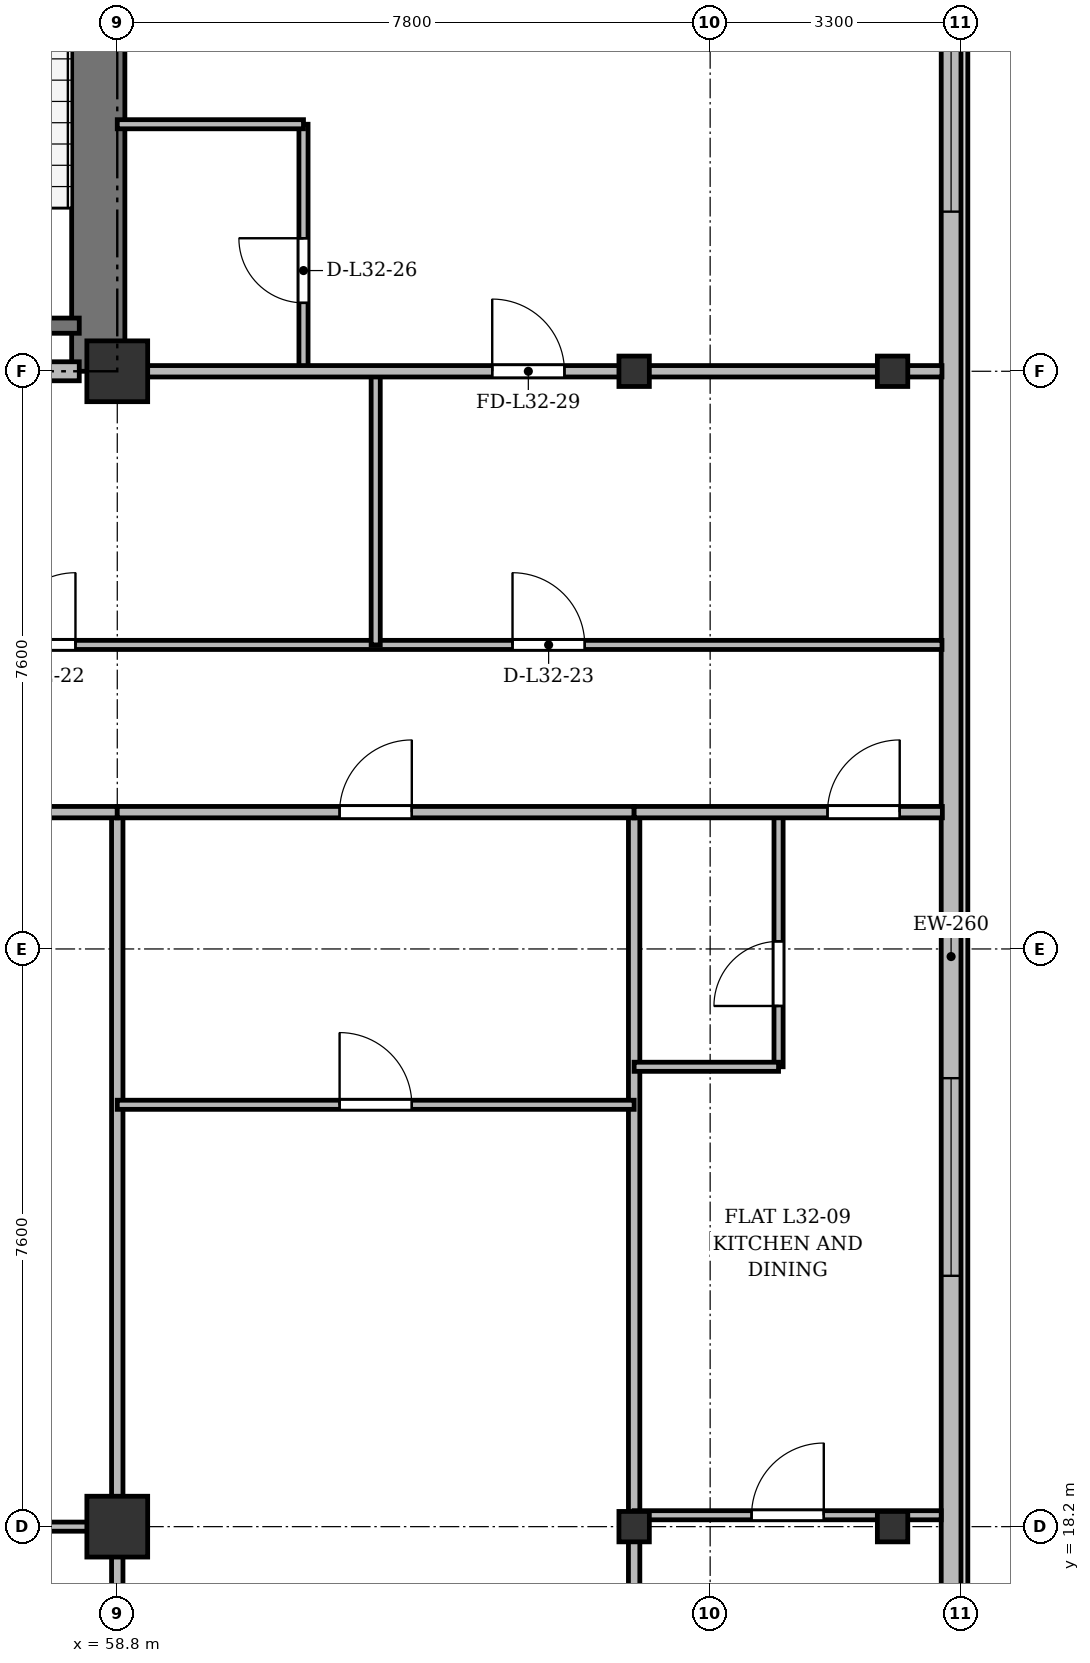
"""IFC4 building model, lengths in metres.
Left out: names, types, materials, properties, quantities, classifications, styles, units other than length and angle.
Written with IfcOpenShell. Run it as: python <this file> out.ifc"""

import sys

from ifc_helpers import new_model, si_unit, direction, frame, frame_2d, origin, origin_2d, place, context, subcontext, project, spatial, rectangle, i_section, extrude, source, transform, mapped, element, fill, save


model = new_model("IFC4")
c1 = context("Model", 3, precision=1e-05, world=origin(), true_north=direction((0.0, 1.0)))
c2 = subcontext(c1, "Body", "Model", "MODEL_VIEW")
j1 = project(units=[si_unit("LENGTHUNIT", "METRE"), si_unit("PLANEANGLEUNIT", "RADIAN")], contexts=[c1])
p1 = place(None, origin())
s1 = spatial("IfcSite", under=j1, at=p1, CompositionType="ELEMENT")
p2 = place(p1, origin())
s2 = spatial("IfcBuilding", under=s1, at=p2, CompositionType="ELEMENT")
p3 = place(p2, frame((0.0, 0.0, 124.9)))
s3 = spatial("IfcBuildingStorey", under=s2, at=p3, CompositionType="ELEMENT", Elevation=124.9)
m1 = source(origin(), c2, "Body", "SweptSolid", [
    extrude(rectangle(XDim=0.8, YDim=0.8, at=origin_2d()), origin(), (0.0, 0.0, 1.0), 3.6),
])
for number, where, z_axis, x_axis in (
    (1, (58.8, 18.2, 0.0), (0.0, 0.0, 1.0), (1.0, 0.0, 0.0)),
    (2, (58.8, 33.4, 0.0), (0.0, 0.0, 1.0), (1.0, 0.0, 0.0)),
):
    element("IfcColumn", number, at=place(p3, frame(where, z_axis=z_axis, x_axis=x_axis)), inside=s3, PredefinedType="COLUMN", context=c2, shape_type="MappedRepresentation", body=[
        mapped(m1, transform((0.0, 0.0, 0.0), x_axis=(1.0, 0.0, 0.0), y_axis=(0.0, 1.0, 0.0), z_axis=(0.0, 0.0, 1.0), scale=1.0)),
    ])
m2 = source(origin(), c2, "Body", "SweptSolid", [
    extrude(i_section(OverallWidth=0.4, OverallDepth=0.4, WebThickness=0.022, FlangeThickness=0.035, at=origin_2d()), origin(), (0.0, 0.0, 1.0), 3.6),
])
for number, where, z_axis, x_axis in (
    (3, (65.6, 18.2, 0.0), (0.0, 0.0, 1.0), (1.0, 0.0, 0.0)),
    (4, (65.6, 33.4, 0.0), (0.0, 0.0, 1.0), (1.0, 0.0, 0.0)),
    (5, (69.0, 18.2, 0.0), (0.0, 0.0, 1.0), (1.0, 0.0, 0.0)),
    (6, (69.0, 33.4, 0.0), (0.0, 0.0, 1.0), (1.0, 0.0, 0.0)),
):
    element("IfcColumn", number, at=place(p3, frame(where, z_axis=z_axis, x_axis=x_axis)), inside=s3, PredefinedType="COLUMN", context=c2, shape_type="MappedRepresentation", body=[
        mapped(m2, transform((0.0, 0.0, 0.0), x_axis=(1.0, 0.0, 0.0), y_axis=(0.0, 1.0, 0.0), z_axis=(0.0, 0.0, 1.0), scale=1.0)),
    ])
p4 = place(p3, frame((69.77, 45.5, 0.0), z_axis=(0.0, 0.0, 1.0), x_axis=(0.0, -1.0, 0.0)))
e7 = element("IfcWall", 7, at=p4, inside=s3, PredefinedType="SOLIDWALL", context=c2, shape_type="SweptSolid", body=[
    extrude(rectangle(XDim=39.6, YDim=0.26, at=frame_2d((19.8, 0.0))), origin(), (0.0, 0.0, 1.0), 3.34),
])
p5 = place(p4, frame((36.95, 0.0, 0.92)))
e8 = element("IfcOpeningElement", 8, at=p5, cuts=e7, PredefinedType="OPENING", context=c2, shape_type="SweptSolid", body=[
    extrude(rectangle(XDim=1.2, YDim=1.65, at=frame_2d((0.6, 0.825))), frame((0.0, 0.14, 0.0), z_axis=(0.0, -1.0, 0.0), x_axis=(1.0, 0.0, 0.0)), (0.0, 0.0, 1.0), 0.28),
])
p6 = place(p4, frame((32.8, 0.0, 0.92)))
e9 = element("IfcOpeningElement", 9, at=p6, cuts=e7, PredefinedType="OPENING", context=c2, shape_type="SweptSolid", body=[
    extrude(rectangle(XDim=2.6, YDim=1.9, at=frame_2d((1.3, 0.95))), frame((0.0, 0.14, 0.0), z_axis=(0.0, -1.0, 0.0), x_axis=(1.0, 0.0, 0.0)), (0.0, 0.0, 1.0), 0.28),
])
p7 = place(p4, frame((28.6, 0.0, 0.92)))
e10 = element("IfcOpeningElement", 10, at=p7, cuts=e7, PredefinedType="OPENING", context=c2, shape_type="SweptSolid", body=[
    extrude(rectangle(XDim=2.6, YDim=1.9, at=frame_2d((1.3, 0.95))), frame((0.0, 0.14, 0.0), z_axis=(0.0, -1.0, 0.0), x_axis=(1.0, 0.0, 0.0)), (0.0, 0.0, 1.0), 0.28),
])
p8 = place(p4, frame((21.4, 0.0, 0.92)))
e11 = element("IfcOpeningElement", 11, at=p8, cuts=e7, PredefinedType="OPENING", context=c2, shape_type="SweptSolid", body=[
    extrude(rectangle(XDim=2.6, YDim=1.9, at=frame_2d((1.3, 0.95))), frame((0.0, 0.14, 0.0), z_axis=(0.0, -1.0, 0.0), x_axis=(1.0, 0.0, 0.0)), (0.0, 0.0, 1.0), 0.28),
])
p9 = place(p4, frame((7.4, 0.0, 0.92)))
e12 = element("IfcOpeningElement", 12, at=p9, cuts=e7, PredefinedType="OPENING", context=c2, shape_type="SweptSolid", body=[
    extrude(rectangle(XDim=2.6, YDim=1.9, at=frame_2d((1.3, 0.95))), frame((0.0, 0.14, 0.0), z_axis=(0.0, -1.0, 0.0), x_axis=(1.0, 0.0, 0.0)), (0.0, 0.0, 1.0), 0.28),
])
p10 = place(p4, frame((4.5, 0.0, 0.92)))
e13 = element("IfcOpeningElement", 13, at=p10, cuts=e7, PredefinedType="OPENING", context=c2, shape_type="SweptSolid", body=[
    extrude(rectangle(XDim=1.2, YDim=1.65, at=frame_2d((0.6, 0.825))), frame((0.0, 0.14, 0.0), z_axis=(0.0, -1.0, 0.0), x_axis=(1.0, 0.0, 0.0)), (0.0, 0.0, 1.0), 0.28),
])
p11 = place(p4, frame((1.15, 0.0, 0.92)))
e14 = element("IfcOpeningElement", 14, at=p11, cuts=e7, PredefinedType="OPENING", context=c2, shape_type="SweptSolid", body=[
    extrude(rectangle(XDim=1.2, YDim=1.65, at=frame_2d((0.6, 0.825))), frame((0.0, 0.14, 0.0), z_axis=(0.0, -1.0, 0.0), x_axis=(1.0, 0.0, 0.0)), (0.0, 0.0, 1.0), 0.28),
])
p12 = place(p3, frame((58.55, 33.4, 0.0), z_axis=(0.0, 0.0, 1.0), x_axis=(0.0, 1.0, 0.0)))
e15 = element("IfcWall", 15, at=p12, inside=s3, PredefinedType="SHEAR", context=c2, shape_type="SweptSolid", body=[
    extrude(rectangle(XDim=11.7, YDim=0.7, at=frame_2d((5.85, 0.0))), origin(), (0.0, 0.0, 1.0), 3.34),
])
p13 = place(p3, frame((54.9, 34.0, 0.0), z_axis=(0.0, 0.0, 1.0), x_axis=(1.0, 0.0, 0.0)))
e16 = element("IfcWall", 16, at=p13, inside=s3, PredefinedType="SHEAR", context=c2, shape_type="SweptSolid", body=[
    extrude(rectangle(XDim=3.4, YDim=0.2, at=frame_2d((1.7, 0.0))), origin(), (0.0, 0.0, 1.0), 3.34),
])
p14 = place(p3, frame((47.15, 33.4, 0.0), z_axis=(0.0, 0.0, 1.0), x_axis=(1.0, 0.0, 0.0)))
e17 = element("IfcWall", 17, at=p14, inside=s3, PredefinedType="PARTITIONING", context=c2, shape_type="SweptSolid", body=[
    extrude(rectangle(XDim=11.15, YDim=0.25, at=frame_2d((5.575, 0.0))), origin(), (0.0, 0.0, 1.0), 2.752),
])
p15 = place(p14, frame((0.7, 0.0, 0.0)))
e18 = element("IfcOpeningElement", 18, at=p15, cuts=e17, PredefinedType="OPENING", context=c2, shape_type="SweptSolid", body=[
    extrude(rectangle(XDim=0.95, YDim=2.15, at=frame_2d((0.475, 1.075))), frame((0.0, 0.135, 0.0), z_axis=(0.0, -1.0, 0.0), x_axis=(1.0, 0.0, 0.0)), (0.0, 0.0, 1.0), 0.27),
])
p16 = place(p14, frame((6.0, 0.0, 0.0)))
e19 = element("IfcOpeningElement", 19, at=p16, cuts=e17, PredefinedType="OPENING", context=c2, shape_type="SweptSolid", body=[
    extrude(rectangle(XDim=1.2, YDim=2.15, at=frame_2d((0.6, 1.075))), frame((0.0, 0.135, 0.0), z_axis=(0.0, -1.0, 0.0), x_axis=(1.0, 0.0, 0.0)), (0.0, 0.0, 1.0), 0.27),
])
p17 = place(p3, frame((54.8, 29.8, 0.0), z_axis=(0.0, 0.0, 1.0), x_axis=(1.0, 0.0, 0.0)))
e20 = element("IfcWall", 20, at=p17, inside=s3, PredefinedType="PARTITIONING", context=c2, shape_type="SweptSolid", body=[
    extrude(rectangle(XDim=14.85, YDim=0.12, at=frame_2d((7.425, 0.0))), origin(), (0.0, 0.0, 1.0), 2.84),
])
p18 = place(p17, frame((2.5, 0.0, 0.0)))
e21 = element("IfcOpeningElement", 21, at=p18, cuts=e20, PredefinedType="OPENING", context=c2, shape_type="SweptSolid", body=[
    extrude(rectangle(XDim=0.95, YDim=2.15, at=frame_2d((0.475, 1.075))), frame((0.0, 0.07, 0.0), z_axis=(0.0, -1.0, 0.0), x_axis=(1.0, 0.0, 0.0)), (0.0, 0.0, 1.0), 0.14),
])
p19 = place(p17, frame((9.2, 0.0, 0.0)))
e22 = element("IfcOpeningElement", 22, at=p19, cuts=e20, PredefinedType="OPENING", context=c2, shape_type="SweptSolid", body=[
    extrude(rectangle(XDim=0.95, YDim=2.15, at=frame_2d((0.475, 1.075))), frame((0.0, 0.07, 0.0), z_axis=(0.0, -1.0, 0.0), x_axis=(1.0, 0.0, 0.0)), (0.0, 0.0, 1.0), 0.14),
])
p20 = place(p3, frame((62.2, 29.8, 0.0), z_axis=(0.0, 0.0, 1.0), x_axis=(0.0, 1.0, 0.0)))
e23 = element("IfcWall", 23, at=p20, inside=s3, PredefinedType="PARTITIONING", context=c2, shape_type="SweptSolid", body=[
    extrude(rectangle(XDim=3.6, YDim=0.12, at=frame_2d((1.8, 0.0))), origin(), (0.0, 0.0, 1.0), 2.752),
])
p21 = place(p3, frame((61.25, 33.4, 0.0), z_axis=(0.0, 0.0, 1.0), x_axis=(0.0, 1.0, 0.0)))
e24 = element("IfcWall", 24, at=p21, inside=s3, PredefinedType="PARTITIONING", context=c2, shape_type="SweptSolid", body=[
    extrude(rectangle(XDim=3.25, YDim=0.12, at=frame_2d((1.625, 0.0))), origin(), (0.0, 0.0, 1.0), 2.752),
])
p22 = place(p21, frame((0.9, 0.0, 0.0)))
e25 = element("IfcOpeningElement", 25, at=p22, cuts=e24, PredefinedType="OPENING", context=c2, shape_type="SweptSolid", body=[
    extrude(rectangle(XDim=0.85, YDim=2.1, at=frame_2d((0.425, 1.05))), frame((0.0, 0.07, 0.0), z_axis=(0.0, -1.0, 0.0), x_axis=(1.0, 0.0, 0.0)), (0.0, 0.0, 1.0), 0.14),
])
p23 = place(p3, frame((58.8, 36.65, 0.0), z_axis=(0.0, 0.0, 1.0), x_axis=(1.0, 0.0, 0.0)))
e26 = element("IfcWall", 26, at=p23, inside=s3, PredefinedType="PARTITIONING", context=c2, shape_type="SweptSolid", body=[
    extrude(rectangle(XDim=2.45, YDim=0.12, at=frame_2d((1.225, 0.0))), origin(), (0.0, 0.0, 1.0), 2.84),
])
p24 = place(p3, frame((58.8, 33.4, 0.0), z_axis=(0.0, 0.0, 1.0), x_axis=(1.0, 0.0, 0.0)))
e27 = element("IfcWall", 27, at=p24, inside=s3, PredefinedType="PARTITIONING", context=c2, shape_type="SweptSolid", body=[
    extrude(rectangle(XDim=10.85, YDim=0.15, at=frame_2d((5.425, 0.0))), origin(), (0.0, 0.0, 1.0), 2.752),
])
p25 = place(p24, frame((4.933, 0.0, 0.0)))
e28 = element("IfcOpeningElement", 28, at=p25, cuts=e27, PredefinedType="OPENING", context=c2, shape_type="SweptSolid", body=[
    extrude(rectangle(XDim=0.95, YDim=2.15, at=frame_2d((0.475, 1.075))), frame((0.0, 0.085, 0.0), z_axis=(0.0, -1.0, 0.0), x_axis=(1.0, 0.0, 0.0)), (0.0, 0.0, 1.0), 0.17),
])
for number, where, z_axis, x_axis in (
    (29, (58.8, 3.145, 0.0), (0.0, 0.0, 1.0), (0.0, 1.0, 0.0)),
    (30, (65.6, 3.145, 0.0), (0.0, 0.0, 1.0), (0.0, 1.0, 0.0)),
):
    element("IfcWall", number, at=place(p3, frame(where, z_axis=z_axis, x_axis=x_axis)), inside=s3, PredefinedType="PARTITIONING", context=c2, shape_type="SweptSolid", body=[
        extrude(rectangle(XDim=24.455, YDim=0.15, at=frame_2d((12.228, 0.0))), origin(), (0.0, 0.0, 1.0), 2.84),
    ])
p26 = place(p3, frame((51.0, 27.6, 0.0), z_axis=(0.0, 0.0, 1.0), x_axis=(1.0, 0.0, 0.0)))
e31 = element("IfcWall", 31, at=p26, inside=s3, PredefinedType="PARTITIONING", context=c2, shape_type="SweptSolid", body=[
    extrude(rectangle(XDim=7.8, YDim=0.15, at=frame_2d((3.9, 0.0))), origin(), (0.0, 0.0, 1.0), 2.84),
])
p27 = place(p26, frame((3.333, 0.0, 0.0)))
e32 = element("IfcOpeningElement", 32, at=p27, cuts=e31, PredefinedType="OPENING", context=c2, shape_type="SweptSolid", body=[
    extrude(rectangle(XDim=0.95, YDim=2.15, at=frame_2d((0.475, 1.075))), frame((0.0, 0.085, 0.0), z_axis=(0.0, -1.0, 0.0), x_axis=(1.0, 0.0, 0.0)), (0.0, 0.0, 1.0), 0.17),
])
p28 = place(p3, frame((51.0, 18.2, 0.0), z_axis=(0.0, 0.0, 1.0), x_axis=(1.0, 0.0, 0.0)))
e33 = element("IfcWall", 33, at=p28, inside=s3, PredefinedType="PARTITIONING", context=c2, shape_type="SweptSolid", body=[
    extrude(rectangle(XDim=7.8, YDim=0.12, at=frame_2d((3.9, 0.0))), origin(), (0.0, 0.0, 1.0), 2.752),
])
p29 = place(p28, frame((3.333, 0.0, 0.0)))
e34 = element("IfcOpeningElement", 34, at=p29, cuts=e33, PredefinedType="OPENING", context=c2, shape_type="SweptSolid", body=[
    extrude(rectangle(XDim=0.95, YDim=2.15, at=frame_2d((0.475, 1.075))), frame((0.0, 0.07, 0.0), z_axis=(0.0, -1.0, 0.0), x_axis=(1.0, 0.0, 0.0)), (0.0, 0.0, 1.0), 0.14),
])
p30 = place(p3, frame((58.8, 27.6, 0.0), z_axis=(0.0, 0.0, 1.0), x_axis=(1.0, 0.0, 0.0)))
e35 = element("IfcWall", 35, at=p30, inside=s3, PredefinedType="PARTITIONING", context=c2, shape_type="SweptSolid", body=[
    extrude(rectangle(XDim=6.8, YDim=0.15, at=frame_2d((3.4, 0.0))), origin(), (0.0, 0.0, 1.0), 2.84),
])
p31 = place(p30, frame((2.925, 0.0, 0.0)))
e36 = element("IfcOpeningElement", 36, at=p31, cuts=e35, PredefinedType="OPENING", context=c2, shape_type="SweptSolid", body=[
    extrude(rectangle(XDim=0.95, YDim=2.15, at=frame_2d((0.475, 1.075))), frame((0.0, 0.085, 0.0), z_axis=(0.0, -1.0, 0.0), x_axis=(1.0, 0.0, 0.0)), (0.0, 0.0, 1.0), 0.17),
])
p32 = place(p3, frame((58.8, 23.75, 0.0), z_axis=(0.0, 0.0, 1.0), x_axis=(1.0, 0.0, 0.0)))
e37 = element("IfcWall", 37, at=p32, inside=s3, PredefinedType="PARTITIONING", context=c2, shape_type="SweptSolid", body=[
    extrude(rectangle(XDim=6.8, YDim=0.12, at=frame_2d((3.4, 0.0))), origin(), (0.0, 0.0, 1.0), 2.84),
])
p33 = place(p32, frame((2.925, 0.0, 0.0)))
e38 = element("IfcOpeningElement", 38, at=p33, cuts=e37, PredefinedType="OPENING", context=c2, shape_type="SweptSolid", body=[
    extrude(rectangle(XDim=0.95, YDim=2.15, at=frame_2d((0.475, 1.075))), frame((0.0, 0.07, 0.0), z_axis=(0.0, -1.0, 0.0), x_axis=(1.0, 0.0, 0.0)), (0.0, 0.0, 1.0), 0.14),
])
p34 = place(p3, frame((65.6, 18.35, 0.0), z_axis=(0.0, 0.0, 1.0), x_axis=(1.0, 0.0, 0.0)))
e39 = element("IfcWall", 39, at=p34, inside=s3, PredefinedType="PARTITIONING", context=c2, shape_type="SweptSolid", body=[
    extrude(rectangle(XDim=4.04, YDim=0.12, at=frame_2d((2.02, 0.0))), origin(), (0.0, 0.0, 1.0), 2.752),
])
p35 = place(p34, frame((1.545, 0.0, 0.0)))
e40 = element("IfcOpeningElement", 40, at=p35, cuts=e39, PredefinedType="OPENING", context=c2, shape_type="SweptSolid", body=[
    extrude(rectangle(XDim=0.95, YDim=2.15, at=frame_2d((0.475, 1.075))), frame((0.0, 0.07, 0.0), z_axis=(0.0, -1.0, 0.0), x_axis=(1.0, 0.0, 0.0)), (0.0, 0.0, 1.0), 0.14),
])
p36 = place(p3, frame((67.5, 24.25, 0.0), z_axis=(0.0, 0.0, 1.0), x_axis=(0.0, 1.0, 0.0)))
e41 = element("IfcWall", 41, at=p36, inside=s3, PredefinedType="PARTITIONING", context=c2, shape_type="SweptSolid", body=[
    extrude(rectangle(XDim=3.35, YDim=0.12, at=frame_2d((1.675, 0.0))), origin(), (0.0, 0.0, 1.0), 2.99),
])
p37 = place(p36, frame((0.8, 0.0, 0.0)))
e42 = element("IfcOpeningElement", 42, at=p37, cuts=e41, PredefinedType="OPENING", context=c2, shape_type="SweptSolid", body=[
    extrude(rectangle(XDim=0.85, YDim=2.1, at=frame_2d((0.425, 1.05))), frame((0.0, 0.07, 0.0), z_axis=(0.0, -1.0, 0.0), x_axis=(1.0, 0.0, 0.0)), (0.0, 0.0, 1.0), 0.14),
])
p38 = place(p3, frame((65.6, 24.25, 0.0), z_axis=(0.0, 0.0, 1.0), x_axis=(1.0, 0.0, 0.0)))
e43 = element("IfcWall", 43, at=p38, inside=s3, PredefinedType="PARTITIONING", context=c2, shape_type="SweptSolid", body=[
    extrude(rectangle(XDim=1.9, YDim=0.12, at=frame_2d((0.95, 0.0))), origin(), (0.0, 0.0, 1.0), 2.84),
])
p39 = place(p3, frame((65.6, 27.6, 0.0), z_axis=(0.0, 0.0, 1.0), x_axis=(1.0, 0.0, 0.0)))
e44 = element("IfcWall", 44, at=p39, inside=s3, PredefinedType="PARTITIONING", context=c2, shape_type="SweptSolid", body=[
    extrude(rectangle(XDim=4.055, YDim=0.15, at=frame_2d((2.027, 0.0))), origin(), (0.0, 0.0, 1.0), 2.84),
])
p40 = place(p39, frame((2.544, 0.0, 0.0)))
e45 = element("IfcOpeningElement", 45, at=p40, cuts=e44, PredefinedType="OPENING", context=c2, shape_type="SweptSolid", body=[
    extrude(rectangle(XDim=0.95, YDim=2.15, at=frame_2d((0.475, 1.075))), frame((0.0, 0.085, 0.0), z_axis=(0.0, -1.0, 0.0), x_axis=(1.0, 0.0, 0.0)), (0.0, 0.0, 1.0), 0.17),
])
m3 = source(origin(), c2, "Body", "SweptSolid", [
    extrude(rectangle(XDim=2.6, YDim=1.9, at=frame_2d((1.3, 0.95))), frame((0.0, 0.03, 0.0), z_axis=(0.0, -1.0, 0.0), x_axis=(1.0, 0.0, 0.0)), (0.0, 0.0, 1.0), 0.06),
])
p41 = place(p8, origin())
e46 = element("IfcWindow", 46, at=p41, inside=s3, PartitioningType="SINGLE_PANEL", PredefinedType="WINDOW", context=c2, shape_type="MappedRepresentation", body=[
    mapped(m3, transform((0.0, 0.0, 0.0), x_axis=(1.0, 0.0, 0.0), y_axis=(0.0, 1.0, 0.0), z_axis=(0.0, 0.0, 1.0), scale=1.0)),
])
fill(e11, e46)
p42 = place(p9, origin())
e47 = element("IfcWindow", 47, at=p42, inside=s3, PartitioningType="SINGLE_PANEL", PredefinedType="WINDOW", context=c2, shape_type="MappedRepresentation", body=[
    mapped(m3, transform((0.0, 0.0, 0.0), x_axis=(1.0, 0.0, 0.0), y_axis=(0.0, 1.0, 0.0), z_axis=(0.0, 0.0, 1.0), scale=1.0)),
])
fill(e12, e47)
m4 = source(origin(), c2, "Body", "SweptSolid", [
    extrude(rectangle(XDim=0.95, YDim=2.15, at=frame_2d((0.475, 1.075))), frame((0.0, 0.025, 0.0), z_axis=(0.0, -1.0, 0.0), x_axis=(1.0, 0.0, 0.0)), (0.0, 0.0, 1.0), 0.05),
])
p43 = place(p18, origin())
e48 = element("IfcDoor", 48, at=p43, inside=s3, OperationType="SINGLE_SWING_RIGHT", PredefinedType="DOOR", context=c2, shape_type="MappedRepresentation", body=[
    mapped(m4, transform((0.0, 0.0, 0.0), x_axis=(1.0, 0.0, 0.0), y_axis=(0.0, 1.0, 0.0), z_axis=(0.0, 0.0, 1.0), scale=1.0)),
])
fill(e21, e48)
p44 = place(p19, origin())
e49 = element("IfcDoor", 49, at=p44, inside=s3, OperationType="SINGLE_SWING_LEFT", PredefinedType="DOOR", context=c2, shape_type="MappedRepresentation", body=[
    mapped(m4, transform((0.0, 0.0, 0.0), x_axis=(1.0, 0.0, 0.0), y_axis=(0.0, 1.0, 0.0), z_axis=(0.0, 0.0, 1.0), scale=1.0)),
])
fill(e22, e49)
m5 = source(origin(), c2, "Body", "SweptSolid", [
    extrude(rectangle(XDim=0.85, YDim=2.1, at=frame_2d((0.425, 1.05))), frame((0.0, 0.025, 0.0), z_axis=(0.0, -1.0, 0.0), x_axis=(1.0, 0.0, 0.0)), (0.0, 0.0, 1.0), 0.05),
])
p45 = place(p22, origin())
e50 = element("IfcDoor", 50, at=p45, inside=s3, OperationType="SINGLE_SWING_RIGHT", PredefinedType="DOOR", context=c2, shape_type="MappedRepresentation", body=[
    mapped(m5, transform((0.0, 0.0, 0.0), x_axis=(1.0, 0.0, 0.0), y_axis=(0.0, 1.0, 0.0), z_axis=(0.0, 0.0, 1.0), scale=1.0)),
])
fill(e25, e50)
p46 = place(p25, origin())
e51 = element("IfcDoor", 51, at=p46, inside=s3, OperationType="SINGLE_SWING_LEFT", PredefinedType="DOOR", context=c2, shape_type="MappedRepresentation", body=[
    mapped(m4, transform((0.0, 0.0, 0.0), x_axis=(1.0, 0.0, 0.0), y_axis=(0.0, 1.0, 0.0), z_axis=(0.0, 0.0, 1.0), scale=1.0)),
])
fill(e28, e51)
p47 = place(p31, origin())
e52 = element("IfcDoor", 52, at=p47, inside=s3, OperationType="SINGLE_SWING_RIGHT", PredefinedType="DOOR", context=c2, shape_type="MappedRepresentation", body=[
    mapped(m4, transform((0.0, 0.0, 0.0), x_axis=(1.0, 0.0, 0.0), y_axis=(0.0, 1.0, 0.0), z_axis=(0.0, 0.0, 1.0), scale=1.0)),
])
fill(e36, e52)
p48 = place(p33, origin())
e53 = element("IfcDoor", 53, at=p48, inside=s3, OperationType="SINGLE_SWING_LEFT", PredefinedType="DOOR", context=c2, shape_type="MappedRepresentation", body=[
    mapped(m4, transform((0.0, 0.0, 0.0), x_axis=(1.0, 0.0, 0.0), y_axis=(0.0, 1.0, 0.0), z_axis=(0.0, 0.0, 1.0), scale=1.0)),
])
fill(e38, e53)
p49 = place(p35, origin())
e54 = element("IfcDoor", 54, at=p49, inside=s3, OperationType="SINGLE_SWING_RIGHT", PredefinedType="DOOR", context=c2, shape_type="MappedRepresentation", body=[
    mapped(m4, transform((0.0, 0.0, 0.0), x_axis=(1.0, 0.0, 0.0), y_axis=(0.0, 1.0, 0.0), z_axis=(0.0, 0.0, 1.0), scale=1.0)),
])
fill(e40, e54)
p50 = place(p37, origin())
e55 = element("IfcDoor", 55, at=p50, inside=s3, OperationType="SINGLE_SWING_LEFT", PredefinedType="DOOR", context=c2, shape_type="MappedRepresentation", body=[
    mapped(m5, transform((0.0, 0.0, 0.0), x_axis=(1.0, 0.0, 0.0), y_axis=(0.0, 1.0, 0.0), z_axis=(0.0, 0.0, 1.0), scale=1.0)),
])
fill(e42, e55)
p51 = place(p40, origin())
e56 = element("IfcDoor", 56, at=p51, inside=s3, OperationType="SINGLE_SWING_RIGHT", PredefinedType="DOOR", context=c2, shape_type="MappedRepresentation", body=[
    mapped(m4, transform((0.0, 0.0, 0.0), x_axis=(1.0, 0.0, 0.0), y_axis=(0.0, 1.0, 0.0), z_axis=(0.0, 0.0, 1.0), scale=1.0)),
])
fill(e45, e56)
save(model, sys.argv[1])
